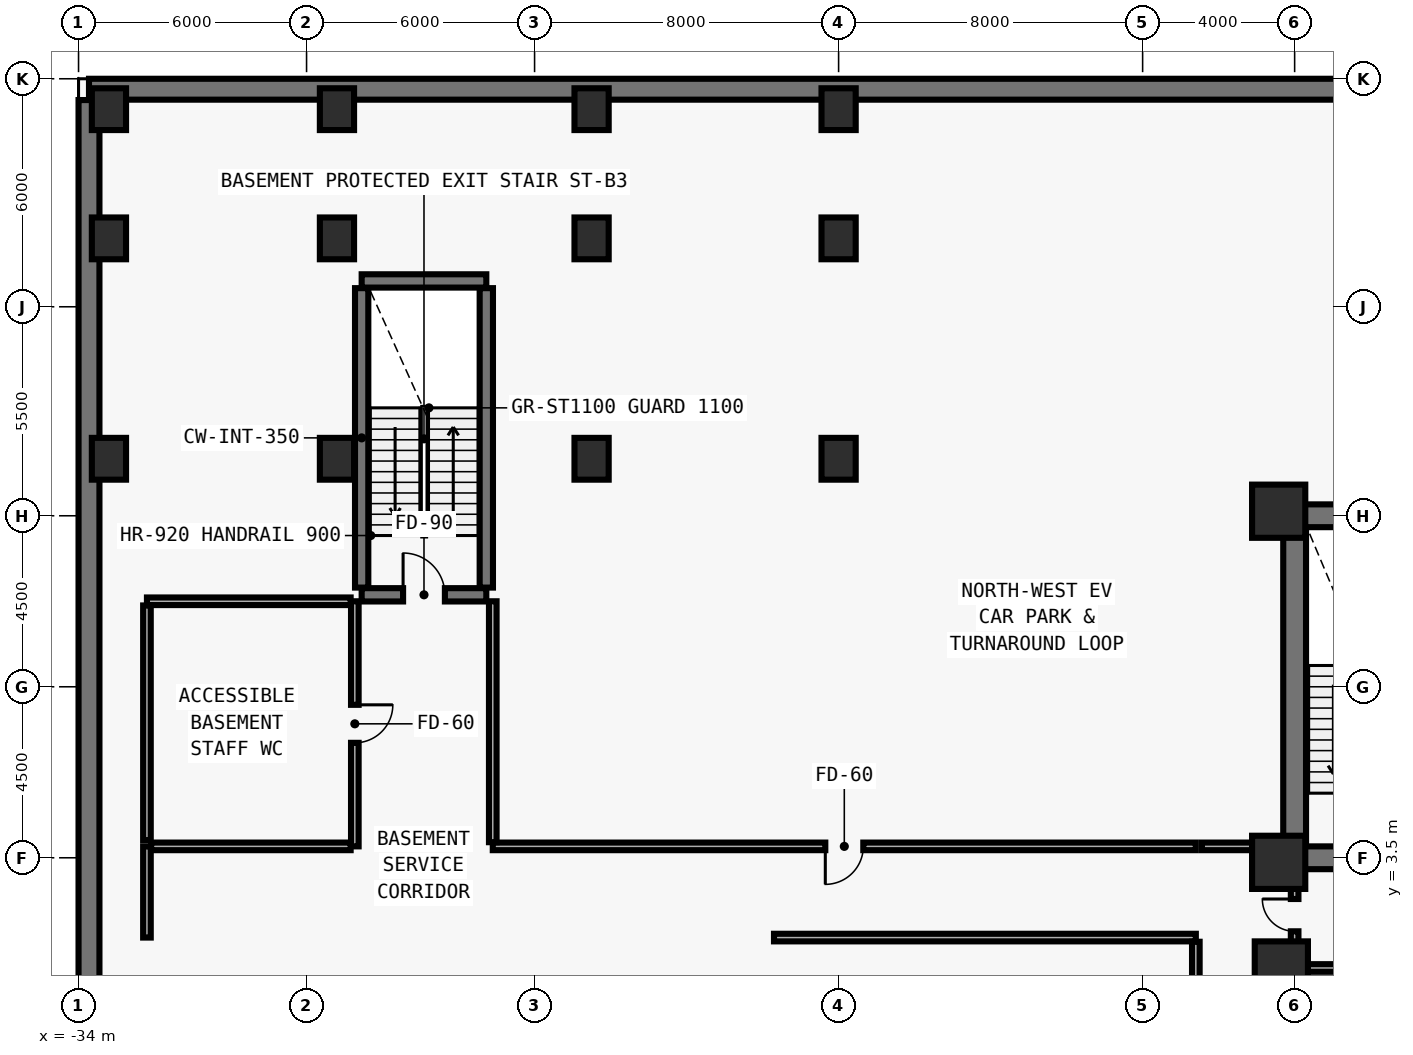
"""IFC4 building model, lengths in metres.
Left out: names, types, materials, properties, quantities, classifications, styles, units other than length and angle.
Written with IfcOpenShell. Run it as: python <this file> out.ifc"""

import sys

from ifc_helpers import new_model, si_unit, direction, frame, frame_2d, origin, origin_2d, place, context, subcontext, project, spatial, rectangle, extrude, element, fill, save


model = new_model("IFC4")
c1 = context("Model", 3, precision=1e-05, world=origin(), true_north=direction((0.0, 1.0)))
c2 = subcontext(c1, "Body", "Model", "MODEL_VIEW")
j1 = project(units=[si_unit("LENGTHUNIT", "METRE"), si_unit("PLANEANGLEUNIT", "RADIAN")], contexts=[c1])
p1 = place(None, origin())
s1 = spatial("IfcSite", under=j1, at=p1, CompositionType="ELEMENT")
p2 = place(p1, origin())
s2 = spatial("IfcBuilding", under=s1, at=p2, CompositionType="ELEMENT")
p3 = place(p2, frame((0.0, 0.0, -9.0)))
s3 = spatial("IfcBuildingStorey", under=s2, at=p3, CompositionType="ELEMENT", Elevation=-9.0)
p4 = place(p3, frame((-26.55, 10.42, 0.0), z_axis=(0.0, 0.0, 1.0), x_axis=(1.0, 0.0, 0.0)))
e1 = element("IfcWall", 1, at=p4, inside=s3, PredefinedType="SHEAR", context=c2, shape_type="SweptSolid", body=[
    extrude(rectangle(XDim=3.28, YDim=0.35, at=frame_2d((1.64, 0.0))), origin(), (0.0, 0.0, 1.0), 4.492),
])
p5 = place(p4, frame((1.09, 0.0, 0.0)))
e2 = element("IfcOpeningElement", 2, at=p5, cuts=e1, PredefinedType="OPENING", context=c2, shape_type="SweptSolid", body=[
    extrude(rectangle(XDim=1.1, YDim=2.15, at=frame_2d((0.55, 1.075))), frame((0.0, 0.185, 0.0), z_axis=(0.0, -1.0, 0.0), x_axis=(1.0, 0.0, 0.0)), (0.0, 0.0, 1.0), 0.37),
])
p6 = place(p3, frame((-26.55, 18.68, 0.0), z_axis=(0.0, 0.0, 1.0), x_axis=(1.0, 0.0, 0.0)))
e3 = element("IfcWall", 3, at=p6, inside=s3, PredefinedType="SHEAR", context=c2, shape_type="SweptSolid", body=[
    extrude(rectangle(XDim=3.28, YDim=0.35, at=frame_2d((1.64, 0.0))), origin(), (0.0, 0.0, 1.0), 4.492),
])
for number, where, z_axis, x_axis in (
    (4, (-26.55, 10.61, 0.0), (0.0, 0.0, 1.0), (0.0, 1.0, 0.0)),
    (5, (-23.27, 10.61, 0.0), (0.0, 0.0, 1.0), (0.0, 1.0, 0.0)),
):
    element("IfcWall", number, at=place(p3, frame(where, z_axis=z_axis, x_axis=x_axis)), inside=s3, PredefinedType="SHEAR", context=c2, shape_type="SweptSolid", body=[
        extrude(rectangle(XDim=7.88, YDim=0.35, at=frame_2d((3.94, 0.0))), origin(), (0.0, 0.0, 1.0), 4.492),
    ])
p7 = place(p3, frame((-2.0, 3.5, 0.0), z_axis=(0.0, 0.0, 1.0), x_axis=(1.0, 0.0, 0.0)))
e6 = element("IfcWall", 6, at=p7, inside=s3, PredefinedType="SHEAR", context=c2, shape_type="SweptSolid", body=[
    extrude(rectangle(XDim=10.0, YDim=0.6, at=frame_2d((5.0, 0.0))), origin(), (0.0, 0.0, 1.0), 4.492),
])
p8 = place(p7, frame((1.65, 0.0, 0.0)))
e7 = element("IfcOpeningElement", 7, at=p8, cuts=e6, PredefinedType="OPENING", context=c2, shape_type="SweptSolid", body=[
    extrude(rectangle(XDim=1.1, YDim=2.15, at=frame_2d((0.55, 1.075))), frame((0.0, 0.31, 0.0), z_axis=(0.0, -1.0, 0.0), x_axis=(1.0, 0.0, 0.0)), (0.0, 0.0, 1.0), 0.62),
])
p9 = place(p7, frame((7.65, 0.0, 0.0)))
e8 = element("IfcOpeningElement", 8, at=p9, cuts=e6, PredefinedType="OPENING", context=c2, shape_type="SweptSolid", body=[
    extrude(rectangle(XDim=1.1, YDim=2.15, at=frame_2d((0.55, 1.075))), frame((0.0, 0.31, 0.0), z_axis=(0.0, -1.0, 0.0), x_axis=(1.0, 0.0, 0.0)), (0.0, 0.0, 1.0), 0.62),
])
p10 = place(p7, frame((3.72, 0.0, 0.0)))
e9 = element("IfcOpeningElement", 9, at=p10, cuts=e6, PredefinedType="OPENING", context=c2, shape_type="SweptSolid", body=[
    extrude(rectangle(XDim=1.1, YDim=2.2, at=frame_2d((0.55, 1.1))), frame((0.0, 0.31, 0.0), z_axis=(0.0, -1.0, 0.0), x_axis=(1.0, 0.0, 0.0)), (0.0, 0.0, 1.0), 0.62),
])
p11 = place(p7, frame((5.18, 0.0, 0.0)))
e10 = element("IfcOpeningElement", 10, at=p11, cuts=e6, PredefinedType="OPENING", context=c2, shape_type="SweptSolid", body=[
    extrude(rectangle(XDim=1.1, YDim=2.2, at=frame_2d((0.55, 1.1))), frame((0.0, 0.31, 0.0), z_axis=(0.0, -1.0, 0.0), x_axis=(1.0, 0.0, 0.0)), (0.0, 0.0, 1.0), 0.62),
])
p12 = place(p3, frame((-2.0, 12.5, 0.0), z_axis=(0.0, 0.0, 1.0), x_axis=(1.0, 0.0, 0.0)))
e11 = element("IfcWall", 11, at=p12, inside=s3, PredefinedType="SHEAR", context=c2, shape_type="SweptSolid", body=[
    extrude(rectangle(XDim=10.0, YDim=0.6, at=frame_2d((5.0, 0.0))), origin(), (0.0, 0.0, 1.0), 4.492),
])
p13 = place(p12, frame((3.92, 0.0, 0.0)))
e12 = element("IfcOpeningElement", 12, at=p13, cuts=e11, PredefinedType="OPENING", context=c2, shape_type="SweptSolid", body=[
    extrude(rectangle(XDim=0.85, YDim=2.1, at=frame_2d((0.425, 1.05))), frame((0.0, 0.31, 0.0), z_axis=(0.0, -1.0, 0.0), x_axis=(1.0, 0.0, 0.0)), (0.0, 0.0, 1.0), 0.62),
])
p14 = place(p3, frame((-2.0, 3.81, 0.0), z_axis=(0.0, 0.0, 1.0), x_axis=(0.0, 1.0, 0.0)))
e13 = element("IfcWall", 13, at=p14, inside=s3, PredefinedType="SHEAR", context=c2, shape_type="SweptSolid", body=[
    extrude(rectangle(XDim=8.38, YDim=0.6, at=frame_2d((4.19, 0.0))), origin(), (0.0, 0.0, 1.0), 4.492),
])
p15 = place(p3, frame((-33.725, 23.725, 0.0), z_axis=(0.0, 0.0, 1.0), x_axis=(1.0, 0.0, 0.0)))
e14 = element("IfcWall", 14, at=p15, inside=s3, PredefinedType="SOLIDWALL", context=c2, shape_type="SweptSolid", body=[
    extrude(rectangle(XDim=67.45, YDim=0.55, at=frame_2d((33.725, 0.0))), origin(), (0.0, 0.0, 1.0), 4.492),
])
p16 = place(p3, frame((-33.725, -23.44, 0.0), z_axis=(0.0, 0.0, 1.0), x_axis=(0.0, 1.0, 0.0)))
e15 = element("IfcWall", 15, at=p16, inside=s3, PredefinedType="SOLIDWALL", context=c2, shape_type="SweptSolid", body=[
    extrude(rectangle(XDim=46.88, YDim=0.55, at=frame_2d((23.44, 0.0))), origin(), (0.0, 0.0, 1.0), 4.492),
])
for number, where, z_axis, x_axis in (
    (16, (-2.42, 12.62, 0.0), (0.0, 0.0, 1.0), (1.0, 0.0, 0.0)),
    (17, (-2.42, 3.38, 0.0), (0.0, 0.0, 1.0), (1.0, 0.0, 0.0)),
    (18, (-2.35, 0.6, 0.0), (0.0, 0.0, 1.0), (1.0, 0.0, 0.0)),
):
    element("IfcColumn", number, at=place(p3, frame(where, z_axis=z_axis, x_axis=x_axis)), inside=s3, PredefinedType="COLUMN", context=c2, shape_type="SweptSolid", body=[
        extrude(rectangle(XDim=1.4, YDim=1.4, at=origin_2d()), origin(), (0.0, 0.0, 1.0), 4.475),
    ])
for number, where, z_axis, x_axis in (
    (19, (-33.2, 14.0, 0.0), (0.0, 0.0, 1.0), (1.0, 0.0, 0.0)),
    (20, (-33.2, 19.8, 0.0), (0.0, 0.0, 1.0), (1.0, 0.0, 0.0)),
    (21, (-33.2, 23.2, 0.0), (0.0, 0.0, 1.0), (1.0, 0.0, 0.0)),
    (22, (-27.2, 14.0, 0.0), (0.0, 0.0, 1.0), (1.0, 0.0, 0.0)),
    (23, (-27.2, 19.8, 0.0), (0.0, 0.0, 1.0), (1.0, 0.0, 0.0)),
    (24, (-27.2, 23.2, 0.0), (0.0, 0.0, 1.0), (1.0, 0.0, 0.0)),
    (25, (-20.5, 14.0, 0.0), (0.0, 0.0, 1.0), (1.0, 0.0, 0.0)),
    (26, (-20.5, 19.8, 0.0), (0.0, 0.0, 1.0), (1.0, 0.0, 0.0)),
    (27, (-20.5, 23.2, 0.0), (0.0, 0.0, 1.0), (1.0, 0.0, 0.0)),
    (28, (-14.0, 14.0, 0.0), (0.0, 0.0, 1.0), (1.0, 0.0, 0.0)),
    (29, (-14.0, 19.8, 0.0), (0.0, 0.0, 1.0), (1.0, 0.0, 0.0)),
    (30, (-14.0, 23.2, 0.0), (0.0, 0.0, 1.0), (1.0, 0.0, 0.0)),
):
    element("IfcColumn", number, at=place(p3, frame(where, z_axis=z_axis, x_axis=x_axis)), inside=s3, PredefinedType="COLUMN", context=c2, shape_type="SweptSolid", body=[
        extrude(rectangle(XDim=0.9, YDim=1.1, at=origin_2d()), origin(), (0.0, 0.0, 1.0), 4.475),
    ])
p17 = place(p3, frame((-2.0, 0.72, 0.0), z_axis=(0.0, 0.0, 1.0), x_axis=(0.0, 1.0, 0.0)))
e31 = element("IfcWall", 31, at=p17, inside=s3, PredefinedType="MOVABLE", context=c2, shape_type="SweptSolid", body=[
    extrude(rectangle(XDim=2.25, YDim=0.2, at=frame_2d((1.125, 0.0))), origin(), (0.0, 0.0, 1.0), 3.262),
])
p18 = place(p17, frame((0.845, 0.0, 0.0)))
e32 = element("IfcOpeningElement", 32, at=p18, cuts=e31, PredefinedType="OPENING", context=c2, shape_type="SweptSolid", body=[
    extrude(rectangle(XDim=0.85, YDim=2.1, at=frame_2d((0.425, 1.05))), frame((0.0, 0.11, 0.0), z_axis=(0.0, -1.0, 0.0), x_axis=(1.0, 0.0, 0.0)), (0.0, 0.0, 1.0), 0.22),
])
p19 = place(p3, frame((-4.6, 3.8, 0.0), z_axis=(0.0, 0.0, 1.0), x_axis=(-1.0, 0.0, 0.0)))
e33 = element("IfcWall", 33, at=p19, inside=s3, PredefinedType="MOVABLE", context=c2, shape_type="SweptSolid", body=[
    extrude(rectangle(XDim=18.5, YDim=0.2, at=frame_2d((9.25, 0.0))), origin(), (0.0, 0.0, 1.0), 4.18),
])
p20 = place(p19, frame((8.75, 0.0, 0.0)))
e34 = element("IfcOpeningElement", 34, at=p20, cuts=e33, PredefinedType="OPENING", context=c2, shape_type="SweptSolid", body=[
    extrude(rectangle(XDim=1.0, YDim=2.1, at=frame_2d((0.5, 1.05))), frame((0.0, 0.11, 0.0), z_axis=(0.0, -1.0, 0.0), x_axis=(1.0, 0.0, 0.0)), (0.0, 0.0, 1.0), 0.22),
])
p21 = place(p3, frame((-26.73, 10.25, 0.0), z_axis=(0.0, 0.0, 1.0), x_axis=(0.0, -1.0, 0.0)))
e35 = element("IfcWall", 35, at=p21, inside=s3, PredefinedType="MOVABLE", context=c2, shape_type="SweptSolid", body=[
    extrude(rectangle(XDim=6.45, YDim=0.2, at=frame_2d((3.225, 0.0))), origin(), (0.0, 0.0, 1.0), 4.18),
])
p22 = place(p21, frame((2.725, 0.0, 0.0)))
e36 = element("IfcOpeningElement", 36, at=p22, cuts=e35, PredefinedType="OPENING", context=c2, shape_type="SweptSolid", body=[
    extrude(rectangle(XDim=1.0, YDim=2.1, at=frame_2d((0.5, 1.05))), frame((0.0, 0.11, 0.0), z_axis=(0.0, -1.0, 0.0), x_axis=(1.0, 0.0, 0.0)), (0.0, 0.0, 1.0), 0.22),
])
p23 = place(p3, frame((-1.88, 0.6, 0.0), z_axis=(0.0, 0.0, 1.0), x_axis=(1.0, 0.0, 0.0)))
e37 = element("IfcWall", 37, at=p23, inside=s3, PredefinedType="MOVABLE", context=c2, shape_type="SweptSolid", body=[
    extrude(rectangle(XDim=5.72, YDim=0.2, at=frame_2d((2.86, 0.0))), origin(), (0.0, 0.0, 1.0), 3.362),
])
p24 = place(p3, frame((-2.0, -4.09, 0.0), z_axis=(0.0, 0.0, 1.0), x_axis=(0.0, 1.0, 0.0)))
e38 = element("IfcWall", 38, at=p24, inside=s3, PredefinedType="MOVABLE", context=c2, shape_type="SweptSolid", body=[
    extrude(rectangle(XDim=4.59, YDim=0.2, at=frame_2d((2.295, 0.0))), origin(), (0.0, 0.0, 1.0), 3.362),
])
p25 = place(p3, frame((-15.7, 1.4, 0.0), z_axis=(0.0, 0.0, 1.0), x_axis=(1.0, 0.0, 0.0)))
e39 = element("IfcWall", 39, at=p25, inside=s3, PredefinedType="MOVABLE", context=c2, shape_type="SweptSolid", body=[
    extrude(rectangle(XDim=11.1, YDim=0.2, at=frame_2d((5.55, 0.0))), origin(), (0.0, 0.0, 1.0), 4.18),
])
p26 = place(p3, frame((-4.6, 1.29, 0.0), z_axis=(0.0, 0.0, 1.0), x_axis=(0.0, -1.0, 0.0)))
e40 = element("IfcWall", 40, at=p26, inside=s3, PredefinedType="MOVABLE", context=c2, shape_type="SweptSolid", body=[
    extrude(rectangle(XDim=5.49, YDim=0.2, at=frame_2d((2.745, 0.0))), origin(), (0.0, 0.0, 1.0), 4.18),
])
p27 = place(p3, frame((-23.1, 3.91, 0.0), z_axis=(0.0, 0.0, 1.0), x_axis=(0.0, 1.0, 0.0)))
e41 = element("IfcWall", 41, at=p27, inside=s3, PredefinedType="MOVABLE", context=c2, shape_type="SweptSolid", body=[
    extrude(rectangle(XDim=6.34, YDim=0.2, at=frame_2d((3.17, 0.0))), origin(), (0.0, 0.0, 1.0), 4.18),
])
p28 = place(p3, frame((-2.36, 3.8, 0.0), z_axis=(0.0, 0.0, 1.0), x_axis=(-1.0, 0.0, 0.0)))
e42 = element("IfcWall", 42, at=p28, inside=s3, PredefinedType="MOVABLE", context=c2, shape_type="SweptSolid", body=[
    extrude(rectangle(XDim=2.08, YDim=0.2, at=frame_2d((1.04, 0.0))), origin(), (0.0, 0.0, 1.0), 4.18),
])
p29 = place(p3, frame((-32.2, 3.8, 0.0), z_axis=(0.0, 0.0, 1.0), x_axis=(0.0, -1.0, 0.0)))
e43 = element("IfcWall", 43, at=p29, inside=s3, PredefinedType="MOVABLE", context=c2, shape_type="SweptSolid", body=[
    extrude(rectangle(XDim=2.4, YDim=0.2, at=frame_2d((1.2, 0.0))), origin(), (0.0, 0.0, 1.0), 4.18),
])
p30 = place(p3, frame((-26.84, 3.8, 0.0), z_axis=(0.0, 0.0, 1.0), x_axis=(-1.0, 0.0, 0.0)))
e44 = element("IfcWall", 44, at=p30, inside=s3, PredefinedType="MOVABLE", context=c2, shape_type="SweptSolid", body=[
    extrude(rectangle(XDim=5.25, YDim=0.2, at=frame_2d((2.625, 0.0))), origin(), (0.0, 0.0, 1.0), 4.18),
])
p31 = place(p3, frame((-26.84, 10.25, 0.0), z_axis=(0.0, 0.0, 1.0), x_axis=(-1.0, 0.0, 0.0)))
e45 = element("IfcWall", 45, at=p31, inside=s3, PredefinedType="MOVABLE", context=c2, shape_type="SweptSolid", body=[
    extrude(rectangle(XDim=5.36, YDim=0.2, at=frame_2d((2.68, 0.0))), origin(), (0.0, 0.0, 1.0), 4.18),
])
p32 = place(p3, frame((-32.2, 10.14, 0.0), z_axis=(0.0, 0.0, 1.0), x_axis=(0.0, -1.0, 0.0)))
e46 = element("IfcWall", 46, at=p32, inside=s3, PredefinedType="MOVABLE", context=c2, shape_type="SweptSolid", body=[
    extrude(rectangle(XDim=6.18, YDim=0.2, at=frame_2d((3.09, 0.0))), origin(), (0.0, 0.0, 1.0), 4.18),
])
p33 = place(p5, origin())
e47 = element("IfcDoor", 47, at=p33, inside=s3, OperationType="SINGLE_SWING_LEFT", PredefinedType="DOOR", context=c2, shape_type="SweptSolid", body=[
    extrude(rectangle(XDim=1.1, YDim=2.15, at=frame_2d((0.55, 1.075))), frame((0.0, 0.025, 0.0), z_axis=(0.0, -1.0, 0.0), x_axis=(1.0, 0.0, 0.0)), (0.0, 0.0, 1.0), 0.05),
])
fill(e2, e47)
p34 = place(p18, origin())
e48 = element("IfcDoor", 48, at=p34, inside=s3, OperationType="SINGLE_SWING_RIGHT", PredefinedType="DOOR", context=c2, shape_type="SweptSolid", body=[
    extrude(rectangle(XDim=0.85, YDim=2.1, at=frame_2d((0.425, 1.05))), frame((0.0, 0.025, 0.0), z_axis=(0.0, -1.0, 0.0), x_axis=(1.0, 0.0, 0.0)), (0.0, 0.0, 1.0), 0.05),
])
fill(e32, e48)
p35 = place(p20, origin())
e49 = element("IfcDoor", 49, at=p35, inside=s3, OperationType="SINGLE_SWING_RIGHT", PredefinedType="DOOR", context=c2, shape_type="SweptSolid", body=[
    extrude(rectangle(XDim=1.0, YDim=2.1, at=frame_2d((0.5, 1.05))), frame((0.0, 0.025, 0.0), z_axis=(0.0, -1.0, 0.0), x_axis=(1.0, 0.0, 0.0)), (0.0, 0.0, 1.0), 0.05),
])
fill(e34, e49)
p36 = place(p22, origin())
e50 = element("IfcDoor", 50, at=p36, inside=s3, OperationType="SINGLE_SWING_LEFT", PredefinedType="DOOR", context=c2, shape_type="SweptSolid", body=[
    extrude(rectangle(XDim=1.0, YDim=2.1, at=frame_2d((0.5, 1.05))), frame((0.0, 0.025, 0.0), z_axis=(0.0, -1.0, 0.0), x_axis=(1.0, 0.0, 0.0)), (0.0, 0.0, 1.0), 0.05),
])
fill(e36, e50)
save(model, sys.argv[1])
